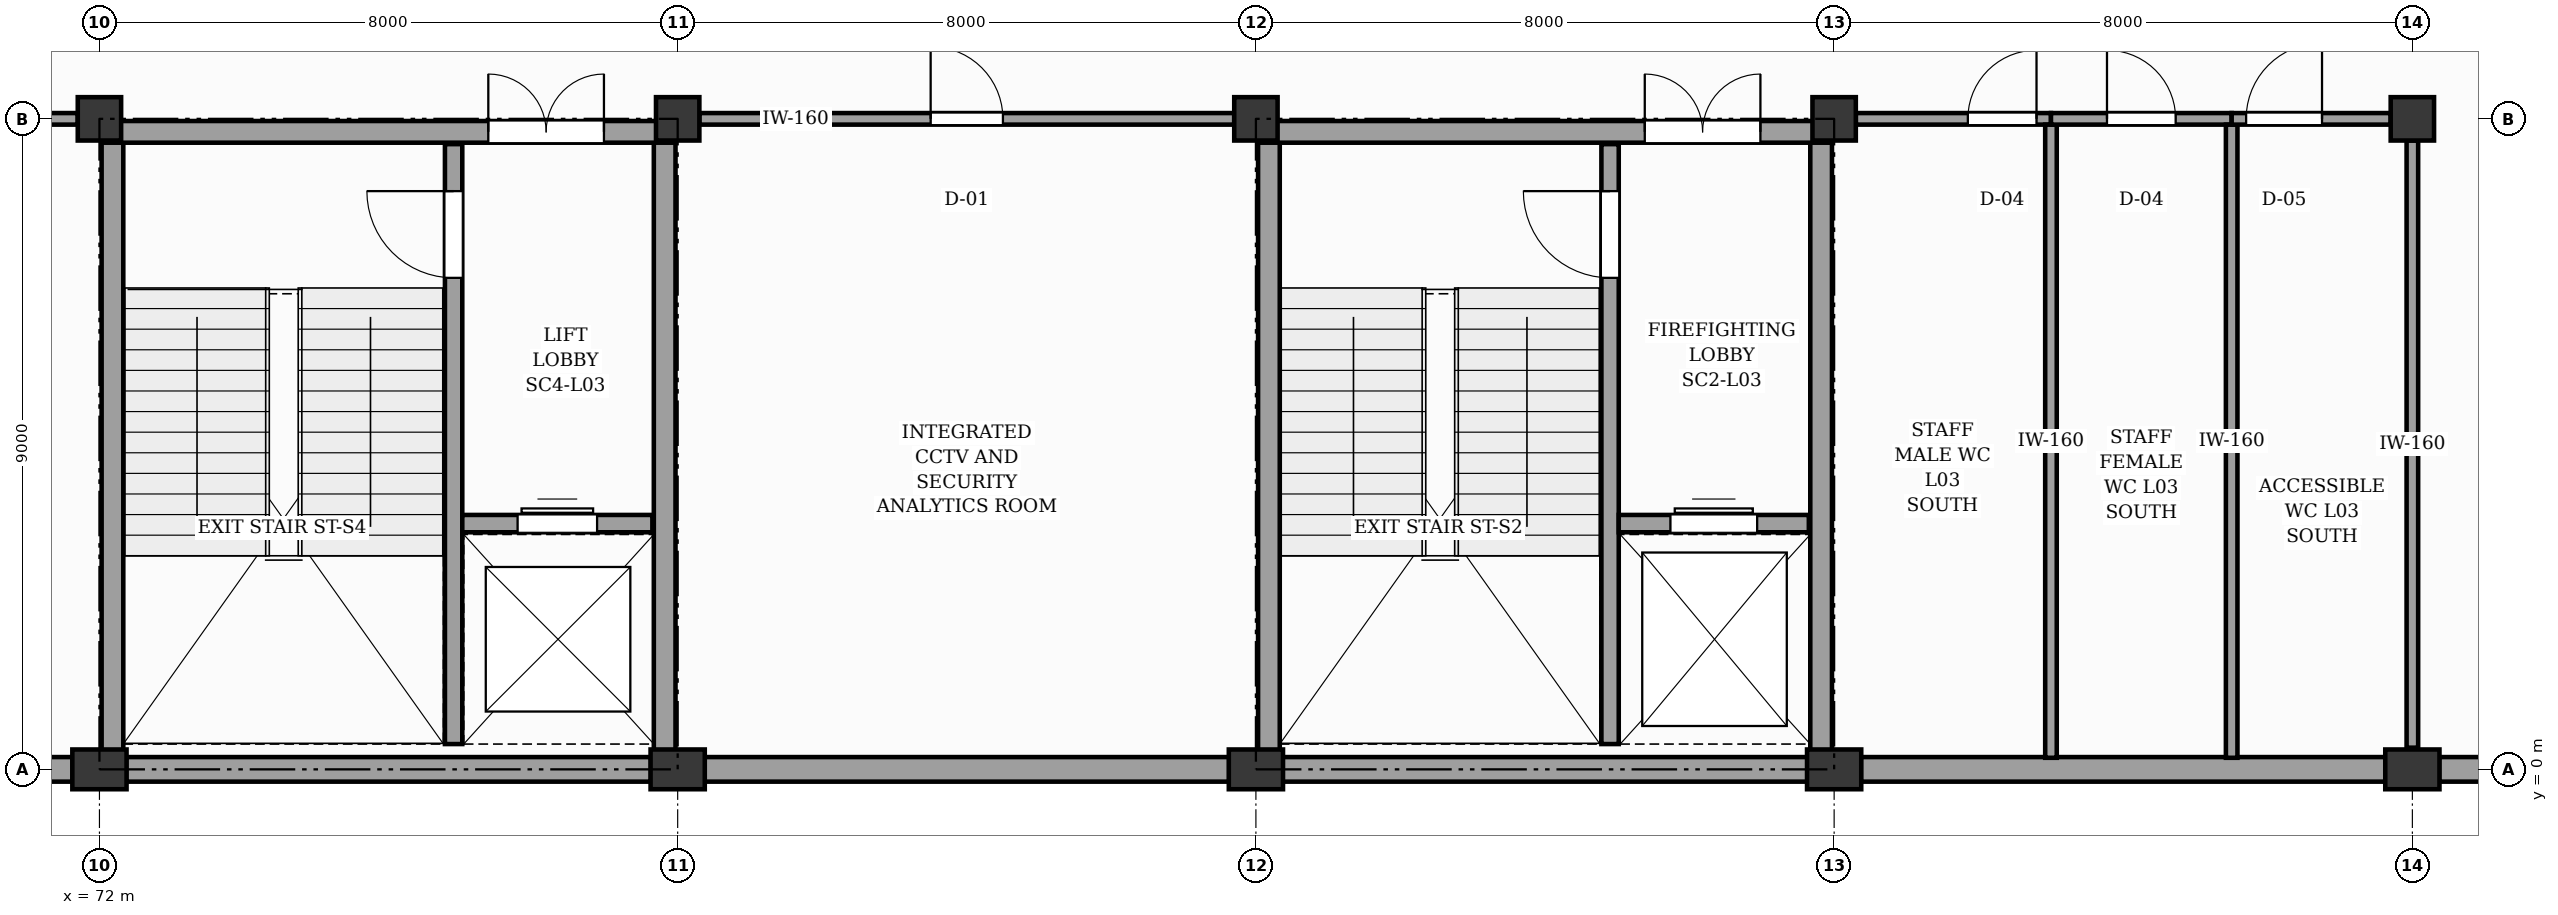
"""IFC4 building model, lengths in metres.
Left out: names, types, materials, properties, quantities, classifications, styles, units other than length and angle.
Written with IfcOpenShell. Run it as: python <this file> out.ifc"""

import sys

from ifc_helpers import new_model, si_unit, direction, frame, frame_2d, origin, origin_2d, place, context, subcontext, project, spatial, rectangle, extrude, element, fill, save


model = new_model("IFC4")
c1 = context("Model", 3, precision=1e-05, world=origin(), true_north=direction((0.0, 1.0)))
c2 = subcontext(c1, "Body", "Model", "MODEL_VIEW")
j1 = project(units=[si_unit("LENGTHUNIT", "METRE"), si_unit("PLANEANGLEUNIT", "RADIAN")], contexts=[c1])
p1 = place(None, origin())
s1 = spatial("IfcSite", under=j1, at=p1, CompositionType="ELEMENT")
p2 = place(p1, origin())
s2 = spatial("IfcBuilding", under=s1, at=p2, CompositionType="ELEMENT")
p3 = place(p2, frame((0.0, 0.0, 16.2)))
s3 = spatial("IfcBuildingStorey", under=s2, at=p3, CompositionType="ELEMENT", Elevation=16.2)
p4 = place(p3, frame((72.0, 0.0, 0.0), z_axis=(0.0, 0.0, 1.0), x_axis=(1.0, 0.0, 0.0)))
e1 = element("IfcColumn", 1, at=p4, inside=s3, PredefinedType="PILASTER", context=c2, shape_type="SweptSolid", body=[
    extrude(rectangle(XDim=0.75, YDim=0.55, at=origin_2d()), origin(), (0.0, 0.0, 1.0), 4.2),
])
p5 = place(p3, frame((72.0, 9.0, 0.0), z_axis=(0.0, 0.0, 1.0), x_axis=(1.0, 0.0, 0.0)))
e2 = element("IfcColumn", 2, at=p5, inside=s3, PredefinedType="COLUMN", context=c2, shape_type="SweptSolid", body=[
    extrude(rectangle(XDim=0.6, YDim=0.6, at=origin_2d()), origin(), (0.0, 0.0, 1.0), 4.2),
])
p6 = place(p3, frame((80.0, 0.0, 0.0), z_axis=(0.0, 0.0, 1.0), x_axis=(1.0, 0.0, 0.0)))
e3 = element("IfcColumn", 3, at=p6, inside=s3, PredefinedType="PILASTER", context=c2, shape_type="SweptSolid", body=[
    extrude(rectangle(XDim=0.75, YDim=0.55, at=origin_2d()), origin(), (0.0, 0.0, 1.0), 4.2),
])
p7 = place(p3, frame((80.0, 9.0, 0.0), z_axis=(0.0, 0.0, 1.0), x_axis=(1.0, 0.0, 0.0)))
e4 = element("IfcColumn", 4, at=p7, inside=s3, PredefinedType="COLUMN", context=c2, shape_type="SweptSolid", body=[
    extrude(rectangle(XDim=0.6, YDim=0.6, at=origin_2d()), origin(), (0.0, 0.0, 1.0), 4.2),
])
p8 = place(p3, frame((88.0, 0.0, 0.0), z_axis=(0.0, 0.0, 1.0), x_axis=(1.0, 0.0, 0.0)))
e5 = element("IfcColumn", 5, at=p8, inside=s3, PredefinedType="PILASTER", context=c2, shape_type="SweptSolid", body=[
    extrude(rectangle(XDim=0.75, YDim=0.55, at=origin_2d()), origin(), (0.0, 0.0, 1.0), 4.2),
])
p9 = place(p3, frame((88.0, 9.0, 0.0), z_axis=(0.0, 0.0, 1.0), x_axis=(1.0, 0.0, 0.0)))
e6 = element("IfcColumn", 6, at=p9, inside=s3, PredefinedType="COLUMN", context=c2, shape_type="SweptSolid", body=[
    extrude(rectangle(XDim=0.6, YDim=0.6, at=origin_2d()), origin(), (0.0, 0.0, 1.0), 4.2),
])
p10 = place(p3, frame((96.0, 0.0, 0.0), z_axis=(0.0, 0.0, 1.0), x_axis=(1.0, 0.0, 0.0)))
e7 = element("IfcColumn", 7, at=p10, inside=s3, PredefinedType="PILASTER", context=c2, shape_type="SweptSolid", body=[
    extrude(rectangle(XDim=0.75, YDim=0.55, at=origin_2d()), origin(), (0.0, 0.0, 1.0), 4.2),
])
p11 = place(p3, frame((96.0, 9.0, 0.0), z_axis=(0.0, 0.0, 1.0), x_axis=(1.0, 0.0, 0.0)))
e8 = element("IfcColumn", 8, at=p11, inside=s3, PredefinedType="COLUMN", context=c2, shape_type="SweptSolid", body=[
    extrude(rectangle(XDim=0.6, YDim=0.6, at=origin_2d()), origin(), (0.0, 0.0, 1.0), 4.2),
])
p12 = place(p3, frame((104.0, 0.0, 0.0), z_axis=(0.0, 0.0, 1.0), x_axis=(1.0, 0.0, 0.0)))
e9 = element("IfcColumn", 9, at=p12, inside=s3, PredefinedType="PILASTER", context=c2, shape_type="SweptSolid", body=[
    extrude(rectangle(XDim=0.75, YDim=0.55, at=origin_2d()), origin(), (0.0, 0.0, 1.0), 4.2),
])
p13 = place(p3, frame((104.0, 9.0, 0.0), z_axis=(0.0, 0.0, 1.0), x_axis=(1.0, 0.0, 0.0)))
e10 = element("IfcColumn", 10, at=p13, inside=s3, PredefinedType="COLUMN", context=c2, shape_type="SweptSolid", body=[
    extrude(rectangle(XDim=0.6, YDim=0.6, at=origin_2d()), origin(), (0.0, 0.0, 1.0), 4.2),
])
p14 = place(p3, frame((64.37, 0.0, 0.0), z_axis=(0.0, 0.0, 1.0), x_axis=(1.0, 0.0, 0.0)))
e11 = element("IfcWall", 11, at=p14, inside=s3, PredefinedType="SOLIDWALL", context=c2, shape_type="SweptSolid", body=[
    extrude(rectangle(XDim=7.26, YDim=0.34, at=frame_2d((3.63, 0.0))), origin(), (0.0, 0.0, 1.0), 2.75),
])
for number, where, z_axis, x_axis in (
    (12, (72.37, 0.0, 0.0), (0.0, 0.0, 1.0), (1.0, 0.0, 0.0)),
    (13, (80.37, 0.0, 0.0), (0.0, 0.0, 1.0), (1.0, 0.0, 0.0)),
    (14, (88.37, 0.0, 0.0), (0.0, 0.0, 1.0), (1.0, 0.0, 0.0)),
    (15, (96.37, 0.0, 0.0), (0.0, 0.0, 1.0), (1.0, 0.0, 0.0)),
    (16, (104.37, 0.0, 0.0), (0.0, 0.0, 1.0), (1.0, 0.0, 0.0)),
):
    element("IfcWall", number, at=place(p3, frame(where, z_axis=z_axis, x_axis=x_axis)), inside=s3, PredefinedType="SOLIDWALL", context=c2, shape_type="SweptSolid", body=[
        extrude(rectangle(XDim=7.26, YDim=0.34, at=frame_2d((3.63, 0.0))), origin(), (0.0, 0.0, 1.0), 3.24),
    ])
p15 = place(p3, frame((92.9, 0.35, 0.0), z_axis=(0.0, 0.0, 1.0), x_axis=(0.0, 1.0, 0.0)))
e17 = element("IfcWall", 17, at=p15, inside=s3, PredefinedType="SHEAR", context=c2, shape_type="SweptSolid", body=[
    extrude(rectangle(XDim=8.3, YDim=0.24, at=frame_2d((4.15, 0.0))), origin(), (0.0, 0.0, 1.0), 3.92),
])
p16 = place(p15, frame((6.45, 0.0, 0.0)))
e18 = element("IfcOpeningElement", 18, at=p16, cuts=e17, PredefinedType="OPENING", context=c2, shape_type="SweptSolid", body=[
    extrude(rectangle(XDim=1.2, YDim=2.15, at=frame_2d((0.6, 1.075))), frame((0.0, 0.13, 0.0), z_axis=(0.0, -1.0, 0.0), x_axis=(1.0, 0.0, 0.0)), (0.0, 0.0, 1.0), 0.26),
])
p17 = place(p3, frame((93.02, 3.4, 0.0), z_axis=(0.0, 0.0, 1.0), x_axis=(1.0, 0.0, 0.0)))
e19 = element("IfcWall", 19, at=p17, inside=s3, PredefinedType="SHEAR", context=c2, shape_type="SweptSolid", body=[
    extrude(rectangle(XDim=2.63, YDim=0.24, at=frame_2d((1.315, 0.0))), origin(), (0.0, 0.0, 1.0), 3.92),
])
p18 = place(p17, frame((0.715, 0.0, 0.0)))
e20 = element("IfcOpeningElement", 20, at=p18, cuts=e19, PredefinedType="OPENING", context=c2, shape_type="SweptSolid", body=[
    extrude(rectangle(XDim=1.2, YDim=2.15, at=frame_2d((0.6, 1.075))), frame((0.0, 0.13, 0.0), z_axis=(0.0, -1.0, 0.0), x_axis=(1.0, 0.0, 0.0)), (0.0, 0.0, 1.0), 0.26),
])
for number, where, z_axis, x_axis in (
    (21, (88.18, 0.18, 0.0), (0.0, 0.0, 1.0), (0.0, 1.0, 0.0)),
    (22, (95.82, 0.18, 0.0), (0.0, 0.0, 1.0), (0.0, 1.0, 0.0)),
):
    element("IfcWall", number, at=place(p3, frame(where, z_axis=z_axis, x_axis=x_axis)), inside=s3, PredefinedType="SHEAR", context=c2, shape_type="SweptSolid", body=[
        extrude(rectangle(XDim=8.64, YDim=0.3, at=frame_2d((4.32, 0.0))), origin(), (0.0, 0.0, 1.0), 3.92),
    ])
p19 = place(p3, frame((88.03, 8.82, 0.0), z_axis=(0.0, 0.0, 1.0), x_axis=(1.0, 0.0, 0.0)))
e23 = element("IfcWall", 23, at=p19, inside=s3, PredefinedType="SHEAR", context=c2, shape_type="SweptSolid", body=[
    extrude(rectangle(XDim=7.94, YDim=0.3, at=frame_2d((3.97, 0.0))), origin(), (0.0, 0.0, 1.0), 3.92),
])
p20 = place(p19, frame((5.35, 0.0, 0.0)))
e24 = element("IfcOpeningElement", 24, at=p20, cuts=e23, PredefinedType="OPENING", context=c2, shape_type="SweptSolid", body=[
    extrude(rectangle(XDim=1.6, YDim=2.15, at=frame_2d((0.8, 1.075))), frame((0.0, 0.16, 0.0), z_axis=(0.0, -1.0, 0.0), x_axis=(1.0, 0.0, 0.0)), (0.0, 0.0, 1.0), 0.32),
])
p21 = place(p3, frame((76.9, 0.35, 0.0), z_axis=(0.0, 0.0, 1.0), x_axis=(0.0, 1.0, 0.0)))
e25 = element("IfcWall", 25, at=p21, inside=s3, PredefinedType="SHEAR", context=c2, shape_type="SweptSolid", body=[
    extrude(rectangle(XDim=8.3, YDim=0.24, at=frame_2d((4.15, 0.0))), origin(), (0.0, 0.0, 1.0), 3.92),
])
p22 = place(p21, frame((6.45, 0.0, 0.0)))
e26 = element("IfcOpeningElement", 26, at=p22, cuts=e25, PredefinedType="OPENING", context=c2, shape_type="SweptSolid", body=[
    extrude(rectangle(XDim=1.2, YDim=2.15, at=frame_2d((0.6, 1.075))), frame((0.0, 0.13, 0.0), z_axis=(0.0, -1.0, 0.0), x_axis=(1.0, 0.0, 0.0)), (0.0, 0.0, 1.0), 0.26),
])
p23 = place(p3, frame((77.02, 3.4, 0.0), z_axis=(0.0, 0.0, 1.0), x_axis=(1.0, 0.0, 0.0)))
e27 = element("IfcWall", 27, at=p23, inside=s3, PredefinedType="SHEAR", context=c2, shape_type="SweptSolid", body=[
    extrude(rectangle(XDim=2.63, YDim=0.24, at=frame_2d((1.315, 0.0))), origin(), (0.0, 0.0, 1.0), 3.92),
])
p24 = place(p23, frame((0.765, 0.0, 0.0)))
e28 = element("IfcOpeningElement", 28, at=p24, cuts=e27, PredefinedType="OPENING", context=c2, shape_type="SweptSolid", body=[
    extrude(rectangle(XDim=1.1, YDim=2.15, at=frame_2d((0.55, 1.075))), frame((0.0, 0.13, 0.0), z_axis=(0.0, -1.0, 0.0), x_axis=(1.0, 0.0, 0.0)), (0.0, 0.0, 1.0), 0.26),
])
for number, where, z_axis, x_axis in (
    (29, (72.18, 0.18, 0.0), (0.0, 0.0, 1.0), (0.0, 1.0, 0.0)),
    (30, (79.82, 0.18, 0.0), (0.0, 0.0, 1.0), (0.0, 1.0, 0.0)),
):
    element("IfcWall", number, at=place(p3, frame(where, z_axis=z_axis, x_axis=x_axis)), inside=s3, PredefinedType="SHEAR", context=c2, shape_type="SweptSolid", body=[
        extrude(rectangle(XDim=8.64, YDim=0.3, at=frame_2d((4.32, 0.0))), origin(), (0.0, 0.0, 1.0), 3.92),
    ])
p25 = place(p3, frame((72.03, 8.82, 0.0), z_axis=(0.0, 0.0, 1.0), x_axis=(1.0, 0.0, 0.0)))
e31 = element("IfcWall", 31, at=p25, inside=s3, PredefinedType="SHEAR", context=c2, shape_type="SweptSolid", body=[
    extrude(rectangle(XDim=7.94, YDim=0.3, at=frame_2d((3.97, 0.0))), origin(), (0.0, 0.0, 1.0), 3.92),
])
p26 = place(p25, frame((5.35, 0.0, 0.0)))
e32 = element("IfcOpeningElement", 32, at=p26, cuts=e31, PredefinedType="OPENING", context=c2, shape_type="SweptSolid", body=[
    extrude(rectangle(XDim=1.6, YDim=2.15, at=frame_2d((0.8, 1.075))), frame((0.0, 0.16, 0.0), z_axis=(0.0, -1.0, 0.0), x_axis=(1.0, 0.0, 0.0)), (0.0, 0.0, 1.0), 0.32),
])
p27 = place(p3, frame((80.3, 9.0, 0.0), z_axis=(0.0, 0.0, 1.0), x_axis=(1.0, 0.0, 0.0)))
e33 = element("IfcWall", 33, at=p27, inside=s3, PredefinedType="PARTITIONING", context=c2, shape_type="SweptSolid", body=[
    extrude(rectangle(XDim=7.4, YDim=0.16, at=frame_2d((3.7, 0.0))), origin(), (0.0, 0.0, 1.0), 3.1),
])
p28 = place(p27, frame((3.2, 0.0, 0.0)))
e34 = element("IfcOpeningElement", 34, at=p28, cuts=e33, PredefinedType="OPENING", context=c2, shape_type="SweptSolid", body=[
    extrude(rectangle(XDim=1.0, YDim=2.1, at=frame_2d((0.5, 1.05))), frame((0.0, 0.09, 0.0), z_axis=(0.0, -1.0, 0.0), x_axis=(1.0, 0.0, 0.0)), (0.0, 0.0, 1.0), 0.18),
])
p29 = place(p3, frame((64.3, 9.0, 0.0), z_axis=(0.0, 0.0, 1.0), x_axis=(1.0, 0.0, 0.0)))
e35 = element("IfcWall", 35, at=p29, inside=s3, PredefinedType="PARTITIONING", context=c2, shape_type="SweptSolid", body=[
    extrude(rectangle(XDim=7.4, YDim=0.16, at=frame_2d((3.7, 0.0))), origin(), (0.0, 0.0, 1.0), 2.3),
])
p30 = place(p29, frame((3.2, 0.0, 0.0)))
e36 = element("IfcOpeningElement", 36, at=p30, cuts=e35, PredefinedType="OPENING", context=c2, shape_type="SweptSolid", body=[
    extrude(rectangle(XDim=1.0, YDim=2.1, at=frame_2d((0.5, 1.05))), frame((0.0, 0.09, 0.0), z_axis=(0.0, -1.0, 0.0), x_axis=(1.0, 0.0, 0.0)), (0.0, 0.0, 1.0), 0.18),
])
p31 = place(p3, frame((96.3, 9.0, 0.0), z_axis=(0.0, 0.0, 1.0), x_axis=(1.0, 0.0, 0.0)))
e37 = element("IfcWall", 37, at=p31, inside=s3, PredefinedType="PARTITIONING", context=c2, shape_type="SweptSolid", body=[
    extrude(rectangle(XDim=2.7, YDim=0.16, at=frame_2d((1.35, 0.0))), origin(), (0.0, 0.0, 1.0), 3.1),
])
p32 = place(p31, frame((1.55, 0.0, 0.0)))
e38 = element("IfcOpeningElement", 38, at=p32, cuts=e37, PredefinedType="OPENING", context=c2, shape_type="SweptSolid", body=[
    extrude(rectangle(XDim=0.95, YDim=2.1, at=frame_2d((0.475, 1.05))), frame((0.0, 0.09, 0.0), z_axis=(0.0, -1.0, 0.0), x_axis=(1.0, 0.0, 0.0)), (0.0, 0.0, 1.0), 0.18),
])
p33 = place(p3, frame((99.0, 0.16, 0.0), z_axis=(0.0, 0.0, 1.0), x_axis=(0.0, 1.0, 0.0)))
e39 = element("IfcWall", 39, at=p33, inside=s3, PredefinedType="PARTITIONING", context=c2, shape_type="SweptSolid", body=[
    extrude(rectangle(XDim=8.76, YDim=0.16, at=frame_2d((4.38, 0.0))), origin(), (0.0, 0.0, 1.0), 3.1),
])
p34 = place(p3, frame((99.0, 9.0, 0.0), z_axis=(0.0, 0.0, 1.0), x_axis=(1.0, 0.0, 0.0)))
e40 = element("IfcWall", 40, at=p34, inside=s3, PredefinedType="PARTITIONING", context=c2, shape_type="SweptSolid", body=[
    extrude(rectangle(XDim=2.5, YDim=0.16, at=frame_2d((1.25, 0.0))), origin(), (0.0, 0.0, 1.0), 3.1),
])
p35 = place(p34, frame((0.775, 0.0, 0.0)))
e41 = element("IfcOpeningElement", 41, at=p35, cuts=e40, PredefinedType="OPENING", context=c2, shape_type="SweptSolid", body=[
    extrude(rectangle(XDim=0.95, YDim=2.1, at=frame_2d((0.475, 1.05))), frame((0.0, 0.09, 0.0), z_axis=(0.0, -1.0, 0.0), x_axis=(1.0, 0.0, 0.0)), (0.0, 0.0, 1.0), 0.18),
])
p36 = place(p3, frame((101.5, 0.16, 0.0), z_axis=(0.0, 0.0, 1.0), x_axis=(0.0, 1.0, 0.0)))
e42 = element("IfcWall", 42, at=p36, inside=s3, PredefinedType="PARTITIONING", context=c2, shape_type="SweptSolid", body=[
    extrude(rectangle(XDim=8.76, YDim=0.16, at=frame_2d((4.38, 0.0))), origin(), (0.0, 0.0, 1.0), 3.1),
])
p37 = place(p3, frame((101.5, 9.0, 0.0), z_axis=(0.0, 0.0, 1.0), x_axis=(1.0, 0.0, 0.0)))
e43 = element("IfcWall", 43, at=p37, inside=s3, PredefinedType="PARTITIONING", context=c2, shape_type="SweptSolid", body=[
    extrude(rectangle(XDim=2.2, YDim=0.16, at=frame_2d((1.1, 0.0))), origin(), (0.0, 0.0, 1.0), 3.1),
])
p38 = place(p37, frame((0.2, 0.0, 0.0)))
e44 = element("IfcOpeningElement", 44, at=p38, cuts=e43, PredefinedType="OPENING", context=c2, shape_type="SweptSolid", body=[
    extrude(rectangle(XDim=1.05, YDim=2.1, at=frame_2d((0.525, 1.05))), frame((0.0, 0.09, 0.0), z_axis=(0.0, -1.0, 0.0), x_axis=(1.0, 0.0, 0.0)), (0.0, 0.0, 1.0), 0.18),
])
p39 = place(p3, frame((104.0, 0.3, 0.0), z_axis=(0.0, 0.0, 1.0), x_axis=(0.0, 1.0, 0.0)))
e45 = element("IfcWall", 45, at=p39, inside=s3, PredefinedType="PARTITIONING", context=c2, shape_type="SweptSolid", body=[
    extrude(rectangle(XDim=8.4, YDim=0.16, at=frame_2d((4.2, 0.0))), origin(), (0.0, 0.0, 1.0), 3.1),
])
p40 = place(p16, origin())
e46 = element("IfcDoor", 46, at=p40, inside=s3, OperationType="SINGLE_SWING_RIGHT", PredefinedType="DOOR", context=c2, shape_type="SweptSolid", body=[
    extrude(rectangle(XDim=1.2, YDim=2.15, at=frame_2d((0.6, 1.075))), frame((0.0, 0.025, 0.0), z_axis=(0.0, -1.0, 0.0), x_axis=(1.0, 0.0, 0.0)), (0.0, 0.0, 1.0), 0.05),
])
fill(e18, e46)
p41 = place(p18, origin())
e47 = element("IfcDoor", 47, at=p41, inside=s3, OperationType="DOUBLE_DOOR_SLIDING", PredefinedType="DOOR", context=c2, shape_type="SweptSolid", body=[
    extrude(rectangle(XDim=1.2, YDim=2.15, at=frame_2d((0.6, 1.075))), frame((0.0, 0.025, 0.0), z_axis=(0.0, -1.0, 0.0), x_axis=(1.0, 0.0, 0.0)), (0.0, 0.0, 1.0), 0.05),
])
fill(e20, e47)
p42 = place(p20, origin())
e48 = element("IfcDoor", 48, at=p42, inside=s3, OperationType="DOUBLE_DOOR_SINGLE_SWING", PredefinedType="DOOR", context=c2, shape_type="SweptSolid", body=[
    extrude(rectangle(XDim=1.6, YDim=2.15, at=frame_2d((0.8, 1.075))), frame((0.0, 0.025, 0.0), z_axis=(0.0, -1.0, 0.0), x_axis=(1.0, 0.0, 0.0)), (0.0, 0.0, 1.0), 0.05),
])
fill(e24, e48)
p43 = place(p22, origin())
e49 = element("IfcDoor", 49, at=p43, inside=s3, OperationType="SINGLE_SWING_RIGHT", PredefinedType="DOOR", context=c2, shape_type="SweptSolid", body=[
    extrude(rectangle(XDim=1.2, YDim=2.15, at=frame_2d((0.6, 1.075))), frame((0.0, 0.025, 0.0), z_axis=(0.0, -1.0, 0.0), x_axis=(1.0, 0.0, 0.0)), (0.0, 0.0, 1.0), 0.05),
])
fill(e26, e49)
p44 = place(p24, origin())
e50 = element("IfcDoor", 50, at=p44, inside=s3, OperationType="DOUBLE_DOOR_SLIDING", PredefinedType="DOOR", context=c2, shape_type="SweptSolid", body=[
    extrude(rectangle(XDim=1.1, YDim=2.15, at=frame_2d((0.55, 1.075))), frame((0.0, 0.025, 0.0), z_axis=(0.0, -1.0, 0.0), x_axis=(1.0, 0.0, 0.0)), (0.0, 0.0, 1.0), 0.05),
])
fill(e28, e50)
p45 = place(p26, origin())
e51 = element("IfcDoor", 51, at=p45, inside=s3, OperationType="DOUBLE_DOOR_SINGLE_SWING", PredefinedType="DOOR", context=c2, shape_type="SweptSolid", body=[
    extrude(rectangle(XDim=1.6, YDim=2.15, at=frame_2d((0.8, 1.075))), frame((0.0, 0.025, 0.0), z_axis=(0.0, -1.0, 0.0), x_axis=(1.0, 0.0, 0.0)), (0.0, 0.0, 1.0), 0.05),
])
fill(e32, e51)
p46 = place(p28, origin())
e52 = element("IfcDoor", 52, at=p46, inside=s3, OperationType="SINGLE_SWING_LEFT", PredefinedType="DOOR", context=c2, shape_type="SweptSolid", body=[
    extrude(rectangle(XDim=1.0, YDim=2.1, at=frame_2d((0.5, 1.05))), frame((0.0, 0.025, 0.0), z_axis=(0.0, -1.0, 0.0), x_axis=(1.0, 0.0, 0.0)), (0.0, 0.0, 1.0), 0.05),
])
fill(e34, e52)
p47 = place(p32, origin())
e53 = element("IfcDoor", 53, at=p47, inside=s3, OperationType="SINGLE_SWING_RIGHT", PredefinedType="DOOR", context=c2, shape_type="SweptSolid", body=[
    extrude(rectangle(XDim=0.95, YDim=2.1, at=frame_2d((0.475, 1.05))), frame((0.0, 0.025, 0.0), z_axis=(0.0, -1.0, 0.0), x_axis=(1.0, 0.0, 0.0)), (0.0, 0.0, 1.0), 0.05),
])
fill(e38, e53)
p48 = place(p35, origin())
e54 = element("IfcDoor", 54, at=p48, inside=s3, OperationType="SINGLE_SWING_LEFT", PredefinedType="DOOR", context=c2, shape_type="SweptSolid", body=[
    extrude(rectangle(XDim=0.95, YDim=2.1, at=frame_2d((0.475, 1.05))), frame((0.0, 0.025, 0.0), z_axis=(0.0, -1.0, 0.0), x_axis=(1.0, 0.0, 0.0)), (0.0, 0.0, 1.0), 0.05),
])
fill(e41, e54)
p49 = place(p38, origin())
e55 = element("IfcDoor", 55, at=p49, inside=s3, OperationType="SINGLE_SWING_RIGHT", PredefinedType="DOOR", context=c2, shape_type="SweptSolid", body=[
    extrude(rectangle(XDim=1.05, YDim=2.1, at=frame_2d((0.525, 1.05))), frame((0.0, 0.025, 0.0), z_axis=(0.0, -1.0, 0.0), x_axis=(1.0, 0.0, 0.0)), (0.0, 0.0, 1.0), 0.05),
])
fill(e44, e55)
save(model, sys.argv[1])
